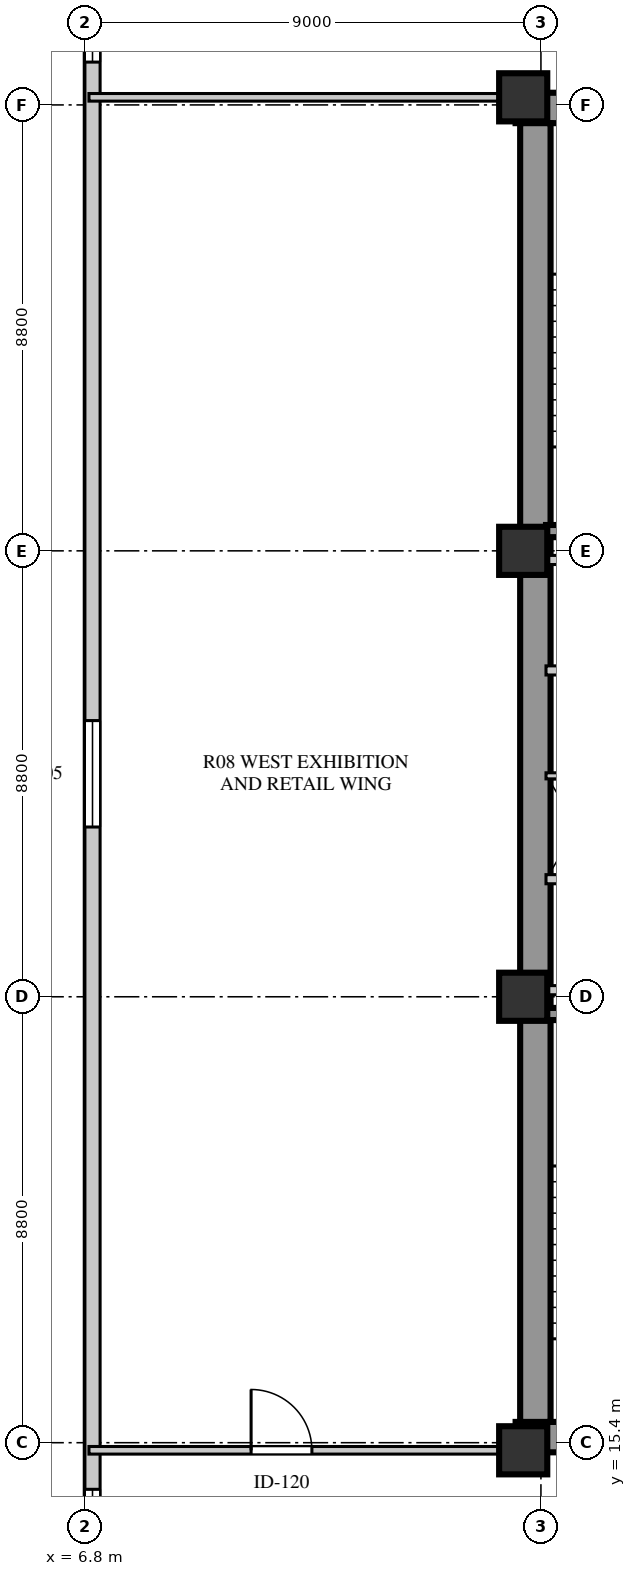
"""IFC4 building model, lengths in metres.
Left out: names, types, materials, properties, quantities, classifications, styles, units other than length and angle.
Written with IfcOpenShell. Run it as: python <this file> out.ifc"""

import sys

from ifc_helpers import new_model, si_unit, direction, frame, frame_2d, origin, origin_2d, place, context, subcontext, project, spatial, rectangle, extrude, element, fill, save


model = new_model("IFC4")
c1 = context("Model", 3, precision=1e-05, world=origin(), true_north=direction((0.0, 1.0)))
c2 = subcontext(c1, "Body", "Model", "MODEL_VIEW")
j1 = project(units=[si_unit("LENGTHUNIT", "METRE"), si_unit("PLANEANGLEUNIT", "RADIAN")], contexts=[c1])
p1 = place(None, origin())
s1 = spatial("IfcSite", under=j1, at=p1, CompositionType="ELEMENT")
p2 = place(p1, origin())
s2 = spatial("IfcBuilding", under=s1, at=p2, CompositionType="ELEMENT")
p3 = place(p2, frame((0.0, 0.0, 8.0)))
s3 = spatial("IfcBuildingStorey", under=s2, at=p3, CompositionType="ELEMENT", Elevation=8.0)
for number, where, z_axis, x_axis in (
    (1, (15.3, 15.51, 0.0), (0.0, 0.0, 1.0), (1.0, 0.0, 0.0)),
    (2, (15.3, 41.74, 0.0), (0.0, 0.0, 1.0), (1.0, 0.0, 0.0)),
):
    element("IfcWall", number, at=place(p3, frame(where, z_axis=z_axis, x_axis=x_axis)), inside=s3, PredefinedType="SHEAR", context=c2, shape_type="SweptSolid", body=[
        extrude(rectangle(XDim=9.88, YDim=0.6, at=frame_2d((4.94, 0.0))), origin(), (0.0, 0.0, 1.0), 4.22),
    ])
p4 = place(p3, frame((15.69, 15.81, 0.0), z_axis=(0.0, 0.0, 1.0), x_axis=(0.0, 1.0, 0.0)))
e3 = element("IfcWall", 3, at=p4, inside=s3, PredefinedType="SHEAR", context=c2, shape_type="SweptSolid", body=[
    extrude(rectangle(XDim=25.63, YDim=0.6, at=frame_2d((12.815, 0.0))), origin(), (0.0, 0.0, 1.0), 4.22),
])
for number, where, z_axis, x_axis in (
    (4, (15.45, 15.25, 0.0), (0.0, 0.0, 1.0), (1.0, 0.0, 0.0)),
    (5, (15.45, 24.2, 0.0), (0.0, 0.0, 1.0), (1.0, 0.0, 0.0)),
    (6, (15.45, 33.0, 0.0), (0.0, 0.0, 1.0), (1.0, 0.0, 0.0)),
    (7, (15.45, 41.95, 0.0), (0.0, 0.0, 1.0), (1.0, 0.0, 0.0)),
):
    element("IfcColumn", number, at=place(p3, frame(where, z_axis=z_axis, x_axis=x_axis)), inside=s3, PredefinedType="COLUMN", context=c2, shape_type="SweptSolid", body=[
        extrude(rectangle(XDim=0.95, YDim=0.95, at=origin_2d()), origin(), (0.0, 0.0, 1.0), 4.22),
    ])
p5 = place(p3, frame((6.95, 44.8, 0.0), z_axis=(0.0, 0.0, 1.0), x_axis=(0.0, -1.0, 0.0)))
e8 = element("IfcWall", 8, at=p5, inside=s3, PredefinedType="STANDARD", context=c2, shape_type="SweptSolid", body=[
    extrude(rectangle(XDim=32.4, YDim=0.3, at=frame_2d((16.2, 0.0))), origin(), (0.0, 0.0, 1.0), 4.22),
])
p6 = place(p5, frame((30.32, 0.0, 0.8)))
e9 = element("IfcOpeningElement", 9, at=p6, cuts=e8, PredefinedType="OPENING", context=c2, shape_type="SweptSolid", body=[
    extrude(rectangle(XDim=1.2, YDim=1.75, at=frame_2d((0.6, 0.875))), frame((0.0, 0.16, 0.0), z_axis=(0.0, -1.0, 0.0), x_axis=(1.0, 0.0, 0.0)), (0.0, 0.0, 1.0), 0.32),
])
p7 = place(p5, frame((15.15, 0.0, 0.8)))
e10 = element("IfcOpeningElement", 10, at=p7, cuts=e8, PredefinedType="OPENING", context=c2, shape_type="SweptSolid", body=[
    extrude(rectangle(XDim=2.1, YDim=1.95, at=frame_2d((1.05, 0.975))), frame((0.0, 0.16, 0.0), z_axis=(0.0, -1.0, 0.0), x_axis=(1.0, 0.0, 0.0)), (0.0, 0.0, 1.0), 0.32),
])
p8 = place(p5, frame((0.805, 0.0, 0.8)))
e11 = element("IfcOpeningElement", 11, at=p8, cuts=e8, PredefinedType="OPENING", context=c2, shape_type="SweptSolid", body=[
    extrude(rectangle(XDim=1.35, YDim=1.9, at=frame_2d((0.675, 0.95))), frame((0.0, 0.16, 0.0), z_axis=(0.0, -1.0, 0.0), x_axis=(1.0, 0.0, 0.0)), (0.0, 0.0, 1.0), 0.32),
])
p9 = place(p3, frame((15.9, 23.86, 0.0), z_axis=(0.0, 0.0, 1.0), x_axis=(1.0, 0.0, 0.0)))
e12 = element("IfcWall", 12, at=p9, inside=s3, PredefinedType="SHEAR", context=c2, shape_type="SweptSolid", body=[
    extrude(rectangle(XDim=3.52, YDim=0.24, at=frame_2d((1.76, 0.0))), origin(), (0.0, 0.0, 1.0), 4.5),
])
p10 = place(p3, frame((15.9, 26.52, 0.0), z_axis=(0.0, 0.0, 1.0), x_axis=(1.0, 0.0, 0.0)))
e13 = element("IfcWall", 13, at=p10, inside=s3, PredefinedType="SOLIDWALL", context=c2, shape_type="SweptSolid", body=[
    extrude(rectangle(XDim=8.68, YDim=0.18, at=frame_2d((4.34, 0.0))), origin(), (0.0, 0.0, 1.0), 4.22),
])
p11 = place(p10, frame((1.76, 0.0, 0.0)))
e14 = element("IfcOpeningElement", 14, at=p11, cuts=e13, PredefinedType="OPENING", context=c2, shape_type="SweptSolid", body=[
    extrude(rectangle(XDim=1.0, YDim=2.1, at=frame_2d((0.5, 1.05))), frame((0.0, 0.1, 0.0), z_axis=(0.0, -1.0, 0.0), x_axis=(1.0, 0.0, 0.0)), (0.0, 0.0, 1.0), 0.2),
])
p12 = place(p10, frame((3.6, 0.0, 0.0)))
e15 = element("IfcOpeningElement", 15, at=p12, cuts=e13, PredefinedType="OPENING", context=c2, shape_type="SweptSolid", body=[
    extrude(rectangle(XDim=1.0, YDim=2.1, at=frame_2d((0.5, 1.05))), frame((0.0, 0.1, 0.0), z_axis=(0.0, -1.0, 0.0), x_axis=(1.0, 0.0, 0.0)), (0.0, 0.0, 1.0), 0.2),
])
p13 = place(p10, frame((5.44, 0.0, 0.0)))
e16 = element("IfcOpeningElement", 16, at=p13, cuts=e13, PredefinedType="OPENING", context=c2, shape_type="SweptSolid", body=[
    extrude(rectangle(XDim=1.0, YDim=2.1, at=frame_2d((0.5, 1.05))), frame((0.0, 0.1, 0.0), z_axis=(0.0, -1.0, 0.0), x_axis=(1.0, 0.0, 0.0)), (0.0, 0.0, 1.0), 0.2),
])
p14 = place(p10, frame((7.28, 0.0, 0.0)))
e17 = element("IfcOpeningElement", 17, at=p14, cuts=e13, PredefinedType="OPENING", context=c2, shape_type="SweptSolid", body=[
    extrude(rectangle(XDim=1.0, YDim=2.1, at=frame_2d((0.5, 1.05))), frame((0.0, 0.1, 0.0), z_axis=(0.0, -1.0, 0.0), x_axis=(1.0, 0.0, 0.0)), (0.0, 0.0, 1.0), 0.2),
])
p15 = place(p3, frame((15.9, 24.33, 0.0), z_axis=(0.0, 0.0, 1.0), x_axis=(1.0, 0.0, 0.0)))
e18 = element("IfcWall", 18, at=p15, inside=s3, PredefinedType="SOLIDWALL", context=c2, shape_type="SweptSolid", body=[
    extrude(rectangle(XDim=8.68, YDim=0.18, at=frame_2d((4.34, 0.0))), origin(), (0.0, 0.0, 1.0), 3.42),
])
p16 = place(p3, frame((15.9, 28.56, 0.0), z_axis=(0.0, 0.0, 1.0), x_axis=(1.0, 0.0, 0.0)))
e19 = element("IfcWall", 19, at=p16, inside=s3, PredefinedType="PARTITIONING", context=c2, shape_type="SweptSolid", body=[
    extrude(rectangle(XDim=1.2, YDim=0.12, at=frame_2d((0.6, 0.0))), origin(), (0.0, 0.0, 1.0), 4.22),
])
p17 = place(p3, frame((15.9, 30.64, 0.0), z_axis=(0.0, 0.0, 1.0), x_axis=(1.0, 0.0, 0.0)))
e20 = element("IfcWall", 20, at=p17, inside=s3, PredefinedType="SOLIDWALL", context=c2, shape_type="SweptSolid", body=[
    extrude(rectangle(XDim=8.68, YDim=0.18, at=frame_2d((4.34, 0.0))), origin(), (0.0, 0.0, 1.0), 4.22),
])
p18 = place(p17, frame((1.76, 0.0, 0.0)))
e21 = element("IfcOpeningElement", 21, at=p18, cuts=e20, PredefinedType="OPENING", context=c2, shape_type="SweptSolid", body=[
    extrude(rectangle(XDim=1.0, YDim=2.1, at=frame_2d((0.5, 1.05))), frame((0.0, 0.1, 0.0), z_axis=(0.0, -1.0, 0.0), x_axis=(1.0, 0.0, 0.0)), (0.0, 0.0, 1.0), 0.2),
])
p19 = place(p17, frame((3.6, 0.0, 0.0)))
e22 = element("IfcOpeningElement", 22, at=p19, cuts=e20, PredefinedType="OPENING", context=c2, shape_type="SweptSolid", body=[
    extrude(rectangle(XDim=1.0, YDim=2.1, at=frame_2d((0.5, 1.05))), frame((0.0, 0.1, 0.0), z_axis=(0.0, -1.0, 0.0), x_axis=(1.0, 0.0, 0.0)), (0.0, 0.0, 1.0), 0.2),
])
p20 = place(p17, frame((5.44, 0.0, 0.0)))
e23 = element("IfcOpeningElement", 23, at=p20, cuts=e20, PredefinedType="OPENING", context=c2, shape_type="SweptSolid", body=[
    extrude(rectangle(XDim=1.0, YDim=2.1, at=frame_2d((0.5, 1.05))), frame((0.0, 0.1, 0.0), z_axis=(0.0, -1.0, 0.0), x_axis=(1.0, 0.0, 0.0)), (0.0, 0.0, 1.0), 0.2),
])
p21 = place(p17, frame((7.28, 0.0, 0.0)))
e24 = element("IfcOpeningElement", 24, at=p21, cuts=e20, PredefinedType="OPENING", context=c2, shape_type="SweptSolid", body=[
    extrude(rectangle(XDim=1.0, YDim=2.1, at=frame_2d((0.5, 1.05))), frame((0.0, 0.1, 0.0), z_axis=(0.0, -1.0, 0.0), x_axis=(1.0, 0.0, 0.0)), (0.0, 0.0, 1.0), 0.2),
])
p22 = place(p3, frame((15.9, 32.82, 0.0), z_axis=(0.0, 0.0, 1.0), x_axis=(1.0, 0.0, 0.0)))
e25 = element("IfcWall", 25, at=p22, inside=s3, PredefinedType="SOLIDWALL", context=c2, shape_type="SweptSolid", body=[
    extrude(rectangle(XDim=8.68, YDim=0.18, at=frame_2d((4.34, 0.0))), origin(), (0.0, 0.0, 1.0), 3.42),
])
p23 = place(p3, frame((15.9, 33.39, 0.0), z_axis=(0.0, 0.0, 1.0), x_axis=(1.0, 0.0, 0.0)))
e26 = element("IfcWall", 26, at=p23, inside=s3, PredefinedType="SHEAR", context=c2, shape_type="SweptSolid", body=[
    extrude(rectangle(XDim=3.52, YDim=0.24, at=frame_2d((1.76, 0.0))), origin(), (0.0, 0.0, 1.0), 4.5),
])
p24 = place(p3, frame((6.88, 15.25, 0.0), z_axis=(0.0, 0.0, 1.0), x_axis=(1.0, 0.0, 0.0)))
e27 = element("IfcWall", 27, at=p24, inside=s3, PredefinedType="PARTITIONING", context=c2, shape_type="SweptSolid", body=[
    extrude(rectangle(XDim=8.32, YDim=0.15, at=frame_2d((4.16, 0.0))), origin(), (0.0, 0.0, 1.0), 3.72),
])
p25 = place(p24, frame((3.2, 0.0, 0.0)))
e28 = element("IfcOpeningElement", 28, at=p25, cuts=e27, PredefinedType="OPENING", context=c2, shape_type="SweptSolid", body=[
    extrude(rectangle(XDim=1.2, YDim=2.1, at=frame_2d((0.6, 1.05))), frame((0.0, 0.085, 0.0), z_axis=(0.0, -1.0, 0.0), x_axis=(1.0, 0.0, 0.0)), (0.0, 0.0, 1.0), 0.17),
])
p26 = place(p3, frame((6.88, 41.95, 0.0), z_axis=(0.0, 0.0, 1.0), x_axis=(1.0, 0.0, 0.0)))
e29 = element("IfcWall", 29, at=p26, inside=s3, PredefinedType="PARTITIONING", context=c2, shape_type="SweptSolid", body=[
    extrude(rectangle(XDim=8.32, YDim=0.15, at=frame_2d((4.16, 0.0))), origin(), (0.0, 0.0, 1.0), 3.72),
])
p27 = place(p6, origin())
e30 = element("IfcWindow", 30, at=p27, inside=s3, PartitioningType="SINGLE_PANEL", PredefinedType="WINDOW", context=c2, shape_type="SweptSolid", body=[
    extrude(rectangle(XDim=1.2, YDim=1.75, at=frame_2d((0.6, 0.875))), frame((0.0, 0.03, 0.0), z_axis=(0.0, -1.0, 0.0), x_axis=(1.0, 0.0, 0.0)), (0.0, 0.0, 1.0), 0.06),
])
fill(e9, e30)
p28 = place(p7, origin())
e31 = element("IfcWindow", 31, at=p28, inside=s3, PartitioningType="SINGLE_PANEL", PredefinedType="WINDOW", context=c2, shape_type="SweptSolid", body=[
    extrude(rectangle(XDim=2.1, YDim=1.95, at=frame_2d((1.05, 0.975))), frame((0.0, 0.03, 0.0), z_axis=(0.0, -1.0, 0.0), x_axis=(1.0, 0.0, 0.0)), (0.0, 0.0, 1.0), 0.06),
])
fill(e10, e31)
p29 = place(p8, origin())
e32 = element("IfcWindow", 32, at=p29, inside=s3, PartitioningType="SINGLE_PANEL", PredefinedType="WINDOW", context=c2, shape_type="SweptSolid", body=[
    extrude(rectangle(XDim=1.35, YDim=1.9, at=frame_2d((0.675, 0.95))), frame((0.0, 0.03, 0.0), z_axis=(0.0, -1.0, 0.0), x_axis=(1.0, 0.0, 0.0)), (0.0, 0.0, 1.0), 0.06),
])
fill(e11, e32)
p30 = place(p25, origin())
e33 = element("IfcDoor", 33, at=p30, inside=s3, OperationType="SINGLE_SWING_LEFT", PredefinedType="DOOR", context=c2, shape_type="SweptSolid", body=[
    extrude(rectangle(XDim=1.2, YDim=2.1, at=frame_2d((0.6, 1.05))), frame((0.0, 0.025, 0.0), z_axis=(0.0, -1.0, 0.0), x_axis=(1.0, 0.0, 0.0)), (0.0, 0.0, 1.0), 0.05),
])
fill(e28, e33)
save(model, sys.argv[1])
